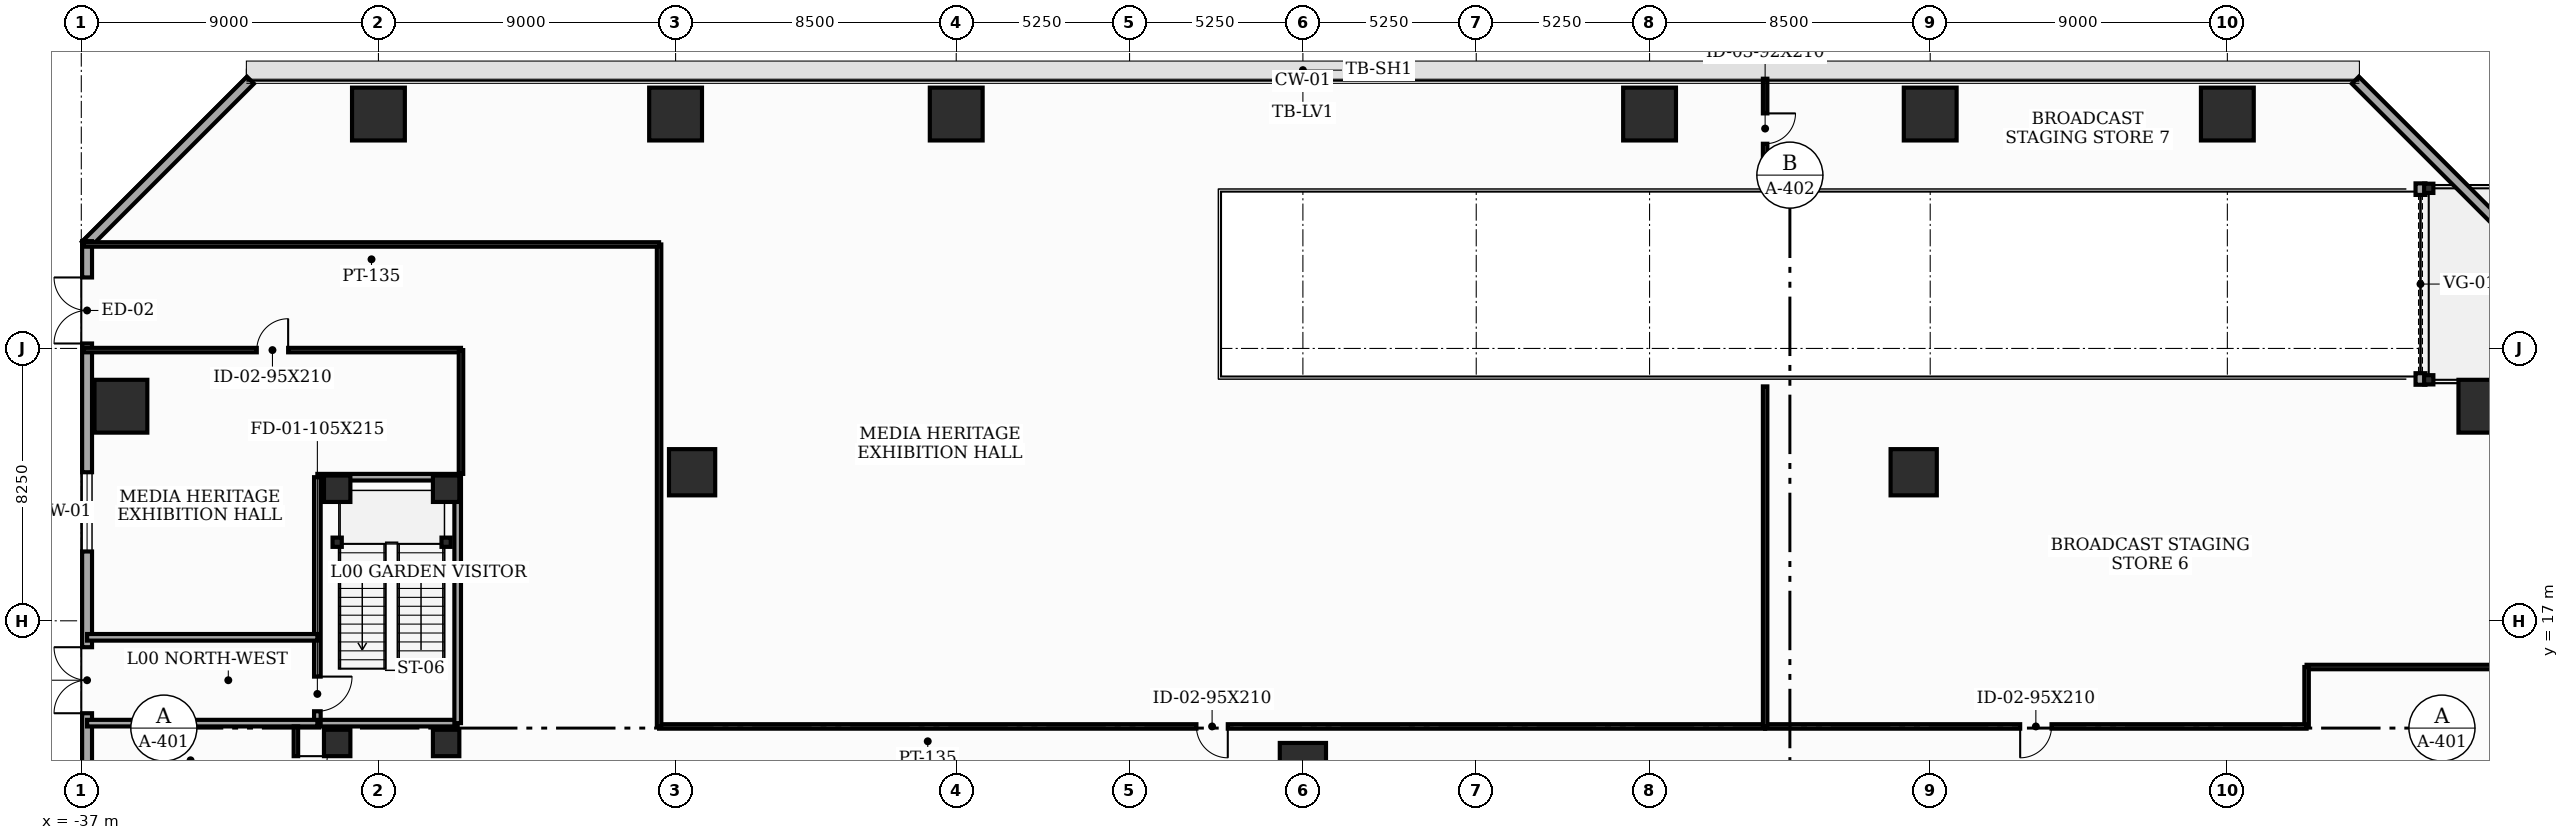
"""IFC4 building model, lengths in metres.
Left out: names, types, materials, properties, quantities, classifications, styles, units other than length and angle.
Written with IfcOpenShell. Run it as: python <this file> out.ifc"""

import sys

from ifc_helpers import new_model, si_unit, direction, frame, frame_2d, origin, origin_2d, place, context, subcontext, project, spatial, rectangle, i_section, extrude, element, fill, save


model = new_model("IFC4")
c1 = context("Model", 3, precision=1e-05, world=origin(), true_north=direction((0.0, 1.0)))
c2 = subcontext(c1, "Body", "Model", "MODEL_VIEW")
j1 = project(units=[si_unit("LENGTHUNIT", "METRE"), si_unit("PLANEANGLEUNIT", "RADIAN")], contexts=[c1])
p1 = place(None, origin())
s1 = spatial("IfcSite", under=j1, at=p1, CompositionType="ELEMENT")
p2 = place(p1, origin())
s2 = spatial("IfcBuilding", under=s1, at=p2, CompositionType="ELEMENT")
p3 = place(p2, origin())
s3 = spatial("IfcBuildingStorey", under=s2, at=p3, CompositionType="ELEMENT", Elevation=0.0)
p4 = place(p3, frame((0.0, 12.6, 0.0), z_axis=(0.0, 0.0, 1.0), x_axis=(1.0, 0.0, 0.0)))
e1 = element("IfcColumn", 1, at=p4, inside=s3, PredefinedType="COLUMN", context=c2, shape_type="SweptSolid", body=[
    extrude(rectangle(XDim=1.4, YDim=1.4, at=origin_2d()), origin(), (0.0, 0.0, 1.0), 5.2),
])
for number, where, z_axis, x_axis in (
    (2, (35.8, 23.5, 0.0), (0.0, 0.0, 1.0), (1.0, 0.0, 0.0)),
    (3, (28.0, 32.35, 0.0), (0.0, 0.0, 1.0), (1.0, 0.0, 0.0)),
    (4, (19.0, 32.35, 0.0), (0.0, 0.0, 1.0), (1.0, 0.0, 0.0)),
    (5, (10.5, 32.35, 0.0), (0.0, 0.0, 1.0), (1.0, 0.0, 0.0)),
    (6, (-10.5, 32.35, 0.0), (0.0, 0.0, 1.0), (1.0, 0.0, 0.0)),
    (7, (-19.0, 32.35, 0.0), (0.0, 0.0, 1.0), (1.0, 0.0, 0.0)),
    (8, (-28.0, 32.35, 0.0), (0.0, 0.0, 1.0), (1.0, 0.0, 0.0)),
    (9, (-35.8, 23.5, 0.0), (0.0, 0.0, 1.0), (1.0, 0.0, 0.0)),
):
    element("IfcColumn", number, at=place(p3, frame(where, z_axis=z_axis, x_axis=x_axis)), inside=s3, PredefinedType="COLUMN", context=c2, shape_type="SweptSolid", body=[
        extrude(rectangle(XDim=1.6, YDim=1.6, at=origin_2d()), origin(), (0.0, 0.0, 1.0), 5.2),
    ])
for number, where, z_axis, x_axis in (
    (10, (-18.5, 21.5, 0.0), (0.0, 0.0, 1.0), (1.0, 0.0, 0.0)),
    (11, (18.5, 21.5, 0.0), (0.0, 0.0, 1.0), (1.0, 0.0, 0.0)),
):
    element("IfcColumn", number, at=place(p3, frame(where, z_axis=z_axis, x_axis=x_axis)), inside=s3, PredefinedType="COLUMN", context=c2, shape_type="SweptSolid", body=[
        extrude(rectangle(XDim=1.4, YDim=1.4, at=origin_2d()), origin(), (0.0, 0.0, 1.0), 5.2),
    ])
for number, where, z_axis, x_axis in (
    (12, (-29.25, 13.3, 0.0), (0.0, 0.0, 1.0), (1.0, 0.0, 0.0)),
    (13, (-25.95, 13.3, 0.0), (0.0, 0.0, 1.0), (1.0, 0.0, 0.0)),
    (14, (-25.95, 21.0, 0.0), (0.0, 0.0, 1.0), (1.0, 0.0, 0.0)),
    (15, (-29.25, 21.0, 0.0), (0.0, 0.0, 1.0), (1.0, 0.0, 0.0)),
):
    element("IfcColumn", number, at=place(p3, frame(where, z_axis=z_axis, x_axis=x_axis)), inside=s3, PredefinedType="COLUMN", context=c2, shape_type="SweptSolid", body=[
        extrude(rectangle(XDim=0.8, YDim=0.8, at=origin_2d()), origin(), (0.0, 0.0, 1.0), 5.2),
    ])
for number, where, z_axis, x_axis in (
    (16, (-29.25, 19.38, 0.0), (0.0, 0.0, 1.0), (1.0, 0.0, 0.0)),
    (17, (-25.95, 19.38, 0.0), (0.0, 0.0, 1.0), (1.0, 0.0, 0.0)),
):
    element("IfcColumn", number, at=place(p3, frame(where, z_axis=z_axis, x_axis=x_axis)), inside=s3, PredefinedType="PILASTER", context=c2, shape_type="SweptSolid", body=[
        extrude(i_section(OverallWidth=0.28, OverallDepth=0.28, WebThickness=0.01, FlangeThickness=0.018, at=origin_2d()), origin(), (0.0, 0.0, 1.0), 5.2),
    ])
for number, where, z_axis, x_axis in (
    (18, (34.1, 24.3, 0.0), (0.0, 0.0, 1.0), (1.0, 0.0, 0.0)),
    (19, (34.1, 30.1, 0.0), (0.0, 0.0, 1.0), (1.0, 0.0, 0.0)),
):
    element("IfcColumn", number, at=place(p3, frame(where, z_axis=z_axis, x_axis=x_axis)), inside=s3, PredefinedType="PILASTER", context=c2, shape_type="SweptSolid", body=[
        extrude(i_section(OverallWidth=0.28, OverallDepth=0.28, WebThickness=0.01, FlangeThickness=0.018, at=origin_2d()), origin(), (0.0, 0.0, 1.0), 4.4),
    ])
p5 = place(p3, frame((33.85, 24.15, 0.0), z_axis=(0.0, 0.0, 1.0), x_axis=(0.0, 1.0, 0.0)))
e20 = element("IfcWall", 20, at=p5, inside=s3, PredefinedType="SOLIDWALL", context=c2, shape_type="SweptSolid", body=[
    extrude(rectangle(XDim=6.1, YDim=0.3, at=frame_2d((3.05, 0.0))), origin(), (0.0, 0.0, 1.0), 4.95),
])
p6 = place(p5, frame((0.35, 0.0, 0.0)))
e21 = element("IfcOpeningElement", 21, at=p6, cuts=e20, PredefinedType="OPENING", context=c2, shape_type="SweptSolid", body=[
    extrude(rectangle(XDim=5.4, YDim=2.8, at=frame_2d((2.7, 1.4))), frame((0.0, 0.16, 0.0), z_axis=(0.0, -1.0, 0.0), x_axis=(1.0, 0.0, 0.0)), (0.0, 0.0, 1.0), 0.32),
])
p7 = place(p3, frame((36.876, 28.376, 0.0), z_axis=(0.0, 0.0, 1.0), x_axis=(-0.707106781187, 0.707106781187, 0.0)))
e22 = element("IfcWall", 22, at=p7, inside=s3, PredefinedType="SOLIDWALL", context=c2, shape_type="SweptSolid", body=[
    extrude(rectangle(XDim=7.071, YDim=0.3, at=frame_2d((3.536, 0.0))), origin(), (0.0, 0.0, 1.0), 4.4),
])
p8 = place(p3, frame((-31.876, 33.376, 0.0), z_axis=(0.0, 0.0, 1.0), x_axis=(-0.707106781187, -0.707106781187, 0.0)))
e23 = element("IfcWall", 23, at=p8, inside=s3, PredefinedType="SOLIDWALL", context=c2, shape_type="SweptSolid", body=[
    extrude(rectangle(XDim=7.071, YDim=0.3, at=frame_2d((3.536, 0.0))), origin(), (0.0, 0.0, 1.0), 4.95),
])
p9 = place(p3, frame((-36.825, 28.5, 0.0), z_axis=(0.0, 0.0, 1.0), x_axis=(0.0, -1.0, 0.0)))
e24 = element("IfcWall", 24, at=p9, inside=s3, PredefinedType="SOLIDWALL", context=c2, shape_type="SweptSolid", body=[
    extrude(rectangle(XDim=48.0, YDim=0.3, at=frame_2d((24.0, 0.0))), origin(), (0.0, 0.0, 1.0), 4.95),
])
p10 = place(p9, frame((1.1, 0.0, 0.0)))
e25 = element("IfcOpeningElement", 25, at=p10, cuts=e24, PredefinedType="OPENING", context=c2, shape_type="SweptSolid", body=[
    extrude(rectangle(XDim=2.0, YDim=2.2, at=frame_2d((1.0, 1.1))), frame((0.0, 0.16, 0.0), z_axis=(0.0, -1.0, 0.0), x_axis=(1.0, 0.0, 0.0)), (0.0, 0.0, 1.0), 0.32),
])
p11 = place(p9, frame((12.3, 0.0, 0.0)))
e26 = element("IfcOpeningElement", 26, at=p11, cuts=e24, PredefinedType="OPENING", context=c2, shape_type="SweptSolid", body=[
    extrude(rectangle(XDim=2.0, YDim=2.2, at=frame_2d((1.0, 1.1))), frame((0.0, 0.16, 0.0), z_axis=(0.0, -1.0, 0.0), x_axis=(1.0, 0.0, 0.0)), (0.0, 0.0, 1.0), 0.32),
])
p12 = place(p9, frame((21.0, 0.0, 0.0)))
e27 = element("IfcOpeningElement", 27, at=p12, cuts=e24, PredefinedType="OPENING", context=c2, shape_type="SweptSolid", body=[
    extrude(rectangle(XDim=2.0, YDim=2.2, at=frame_2d((1.0, 1.1))), frame((0.0, 0.16, 0.0), z_axis=(0.0, -1.0, 0.0), x_axis=(1.0, 0.0, 0.0)), (0.0, 0.0, 1.0), 0.32),
])
p13 = place(p9, frame((7.0, 0.0, 0.9)))
e28 = element("IfcOpeningElement", 28, at=p13, cuts=e24, PredefinedType="OPENING", context=c2, shape_type="SweptSolid", body=[
    extrude(rectangle(XDim=2.4, YDim=1.35, at=frame_2d((1.2, 0.675))), frame((0.0, 0.16, 0.0), z_axis=(0.0, -1.0, 0.0), x_axis=(1.0, 0.0, 0.0)), (0.0, 0.0, 1.0), 0.32),
])
p14 = place(p9, frame((33.4, 0.0, 0.9)))
e29 = element("IfcOpeningElement", 29, at=p14, cuts=e24, PredefinedType="OPENING", context=c2, shape_type="SweptSolid", body=[
    extrude(rectangle(XDim=1.8, YDim=1.35, at=frame_2d((0.9, 0.675))), frame((0.0, 0.16, 0.0), z_axis=(0.0, -1.0, 0.0), x_axis=(1.0, 0.0, 0.0)), (0.0, 0.0, 1.0), 0.32),
])
p15 = place(p9, frame((38.0, 0.0, 0.9)))
e30 = element("IfcOpeningElement", 30, at=p15, cuts=e24, PredefinedType="OPENING", context=c2, shape_type="SweptSolid", body=[
    extrude(rectangle(XDim=2.4, YDim=1.35, at=frame_2d((1.2, 0.675))), frame((0.0, 0.16, 0.0), z_axis=(0.0, -1.0, 0.0), x_axis=(1.0, 0.0, 0.0)), (0.0, 0.0, 1.0), 0.32),
])
p16 = place(p3, frame((-29.85, 13.9, 0.0), z_axis=(0.0, 0.0, 1.0), x_axis=(1.0, 0.0, 0.0)))
e31 = element("IfcWall", 31, at=p16, inside=s3, PredefinedType="SOLIDWALL", context=c2, shape_type="SweptSolid", body=[
    extrude(rectangle(XDim=4.25, YDim=0.2, at=frame_2d((2.125, 0.0))), origin(), (0.0, 0.0, 1.0), 4.435),
])
p17 = place(p3, frame((-25.6, 13.9, 0.0), z_axis=(0.0, 0.0, 1.0), x_axis=(0.0, 1.0, 0.0)))
e32 = element("IfcWall", 32, at=p17, inside=s3, PredefinedType="SOLIDWALL", context=c2, shape_type="SweptSolid", body=[
    extrude(rectangle(XDim=7.45, YDim=0.2, at=frame_2d((3.725, 0.0))), origin(), (0.0, 0.0, 1.0), 4.435),
])
p18 = place(p3, frame((-25.6, 21.35, 0.0), z_axis=(0.0, 0.0, 1.0), x_axis=(-1.0, 0.0, 0.0)))
e33 = element("IfcWall", 33, at=p18, inside=s3, PredefinedType="SOLIDWALL", context=c2, shape_type="SweptSolid", body=[
    extrude(rectangle(XDim=4.25, YDim=0.2, at=frame_2d((2.125, 0.0))), origin(), (0.0, 0.0, 1.0), 4.95),
])
p19 = place(p3, frame((-29.85, 21.35, 0.0), z_axis=(0.0, 0.0, 1.0), x_axis=(0.0, -1.0, 0.0)))
e34 = element("IfcWall", 34, at=p19, inside=s3, PredefinedType="SOLIDWALL", context=c2, shape_type="SweptSolid", body=[
    extrude(rectangle(XDim=7.45, YDim=0.2, at=frame_2d((3.725, 0.0))), origin(), (0.0, 0.0, 1.0), 4.435),
])
p20 = place(p19, frame((6.04, 0.0, 0.0)))
e35 = element("IfcOpeningElement", 35, at=p20, cuts=e34, PredefinedType="OPENING", context=c2, shape_type="SweptSolid", body=[
    extrude(rectangle(XDim=1.05, YDim=2.15, at=frame_2d((0.525, 1.075))), frame((0.0, 0.11, 0.0), z_axis=(0.0, -1.0, 0.0), x_axis=(1.0, 0.0, 0.0)), (0.0, 0.0, 1.0), 0.22),
])
for number, where, z_axis, x_axis in (
    (36, (-36.825, 13.9, 0.0), (0.0, 0.0, 1.0), (1.0, 0.0, 0.0)),
    (37, (-29.85, 16.5, 0.0), (0.0, 0.0, 1.0), (-1.0, 0.0, 0.0)),
):
    element("IfcWall", number, at=place(p3, frame(where, z_axis=z_axis, x_axis=x_axis)), inside=s3, PredefinedType="SOLIDWALL", context=c2, shape_type="SweptSolid", body=[
        extrude(rectangle(XDim=6.975, YDim=0.2, at=frame_2d((3.487, 0.0))), origin(), (0.0, 0.0, 1.0), 4.235),
    ])
p21 = place(p3, frame((36.92, 15.6, 0.0), z_axis=(0.0, 0.0, 1.0), x_axis=(-1.0, 0.0, 0.0)))
e38 = element("IfcWall", 38, at=p21, inside=s3, PredefinedType="PARTITIONING", context=c2, shape_type="SweptSolid", body=[
    extrude(rectangle(XDim=6.52, YDim=0.135, at=frame_2d((3.26, 0.0))), origin(), (0.0, 0.0, 1.0), 4.235),
])
p22 = place(p3, frame((30.4, 15.6, 0.0), z_axis=(0.0, 0.0, 1.0), x_axis=(0.0, -1.0, 0.0)))
e39 = element("IfcWall", 39, at=p22, inside=s3, PredefinedType="PARTITIONING", context=c2, shape_type="SweptSolid", body=[
    extrude(rectangle(XDim=1.8, YDim=0.135, at=frame_2d((0.9, 0.0))), origin(), (0.0, 0.0, 1.0), 4.95),
])
p23 = place(p3, frame((30.4, 13.8, 0.0), z_axis=(0.0, 0.0, 1.0), x_axis=(-1.0, 0.0, 0.0)))
e40 = element("IfcWall", 40, at=p23, inside=s3, PredefinedType="PARTITIONING", context=c2, shape_type="SweptSolid", body=[
    extrude(rectangle(XDim=16.4, YDim=0.135, at=frame_2d((8.2, 0.0))), origin(), (0.0, 0.0, 1.0), 4.235),
])
p24 = place(p23, frame((7.725, 0.0, 0.0)))
e41 = element("IfcOpeningElement", 41, at=p24, cuts=e40, PredefinedType="OPENING", context=c2, shape_type="SweptSolid", body=[
    extrude(rectangle(XDim=0.95, YDim=2.1, at=frame_2d((0.475, 1.05))), frame((0.0, 0.077, 0.0), z_axis=(0.0, -1.0, 0.0), x_axis=(1.0, 0.0, 0.0)), (0.0, 0.0, 1.0), 0.155),
])
p25 = place(p3, frame((14.0, 13.8, 0.0), z_axis=(0.0, 0.0, 1.0), x_axis=(-1.0, 0.0, 0.0)))
e42 = element("IfcWall", 42, at=p25, inside=s3, PredefinedType="PARTITIONING", context=c2, shape_type="SweptSolid", body=[
    extrude(rectangle(XDim=33.5, YDim=0.135, at=frame_2d((16.75, 0.0))), origin(), (0.0, 0.0, 1.0), 3.435),
])
p26 = place(p25, frame((16.275, 0.0, 0.0)))
e43 = element("IfcOpeningElement", 43, at=p26, cuts=e42, PredefinedType="OPENING", context=c2, shape_type="SweptSolid", body=[
    extrude(rectangle(XDim=0.95, YDim=2.1, at=frame_2d((0.475, 1.05))), frame((0.0, 0.077, 0.0), z_axis=(0.0, -1.0, 0.0), x_axis=(1.0, 0.0, 0.0)), (0.0, 0.0, 1.0), 0.155),
])
p27 = place(p3, frame((-19.5, 13.8, 0.0), z_axis=(0.0, 0.0, 1.0), x_axis=(0.0, 1.0, 0.0)))
e44 = element("IfcWall", 44, at=p27, inside=s3, PredefinedType="PARTITIONING", context=c2, shape_type="SweptSolid", body=[
    extrude(rectangle(XDim=14.6, YDim=0.135, at=frame_2d((7.3, 0.0))), origin(), (0.0, 0.0, 1.0), 3.435),
])
p28 = place(p3, frame((-19.5, 28.4, 0.0), z_axis=(0.0, 0.0, 1.0), x_axis=(-1.0, 0.0, 0.0)))
e45 = element("IfcWall", 45, at=p28, inside=s3, PredefinedType="PARTITIONING", context=c2, shape_type="SweptSolid", body=[
    extrude(rectangle(XDim=17.42, YDim=0.135, at=frame_2d((8.71, 0.0))), origin(), (0.0, 0.0, 1.0), 3.435),
])
p29 = place(p3, frame((-36.92, 25.2, 0.0), z_axis=(0.0, 0.0, 1.0), x_axis=(1.0, 0.0, 0.0)))
e46 = element("IfcWall", 46, at=p29, inside=s3, PredefinedType="PARTITIONING", context=c2, shape_type="SweptSolid", body=[
    extrude(rectangle(XDim=11.42, YDim=0.135, at=frame_2d((5.71, 0.0))), origin(), (0.0, 0.0, 1.0), 4.235),
])
p30 = place(p29, frame((5.235, 0.0, 0.0)))
e47 = element("IfcOpeningElement", 47, at=p30, cuts=e46, PredefinedType="OPENING", context=c2, shape_type="SweptSolid", body=[
    extrude(rectangle(XDim=0.95, YDim=2.1, at=frame_2d((0.475, 1.05))), frame((0.0, 0.077, 0.0), z_axis=(0.0, -1.0, 0.0), x_axis=(1.0, 0.0, 0.0)), (0.0, 0.0, 1.0), 0.155),
])
p31 = place(p3, frame((-25.5, 25.2, 0.0), z_axis=(0.0, 0.0, 1.0), x_axis=(0.0, -1.0, 0.0)))
e48 = element("IfcWall", 48, at=p31, inside=s3, PredefinedType="PARTITIONING", context=c2, shape_type="SweptSolid", body=[
    extrude(rectangle(XDim=3.75, YDim=0.135, at=frame_2d((1.875, 0.0))), origin(), (0.0, 0.0, 1.0), 3.435),
])
p32 = place(p3, frame((-30.5, 13.8, 0.0), z_axis=(0.0, 0.0, 1.0), x_axis=(0.0, -1.0, 0.0)))
e49 = element("IfcWall", 49, at=p32, inside=s3, PredefinedType="PARTITIONING", context=c2, shape_type="SweptSolid", body=[
    extrude(rectangle(XDim=2.05, YDim=0.135, at=frame_2d((1.025, 0.0))), origin(), (0.0, 0.0, 1.0), 4.95),
])
p33 = place(p32, frame((0.9, 0.0, 0.0)))
e50 = element("IfcOpeningElement", 50, at=p33, cuts=e49, PredefinedType="OPENING", context=c2, shape_type="SweptSolid", body=[
    extrude(rectangle(XDim=0.95, YDim=2.1, at=frame_2d((0.475, 1.05))), frame((0.0, 0.077, 0.0), z_axis=(0.0, -1.0, 0.0), x_axis=(1.0, 0.0, 0.0)), (0.0, 0.0, 1.0), 0.155),
])
p34 = place(p3, frame((14.0, 24.1, 0.0), z_axis=(0.0, 0.0, 1.0), x_axis=(0.0, -1.0, 0.0)))
e51 = element("IfcWall", 51, at=p34, inside=s3, PredefinedType="PARTITIONING", context=c2, shape_type="SweptSolid", body=[
    extrude(rectangle(XDim=10.3, YDim=0.135, at=frame_2d((5.15, 0.0))), origin(), (0.0, 0.0, 1.0), 3.435),
])
p35 = place(p3, frame((14.0, 33.42, 0.0), z_axis=(0.0, 0.0, 1.0), x_axis=(0.0, -1.0, 0.0)))
e52 = element("IfcWall", 52, at=p35, inside=s3, PredefinedType="PARTITIONING", context=c2, shape_type="SweptSolid", body=[
    extrude(rectangle(XDim=3.02, YDim=0.135, at=frame_2d((1.51, 0.0))), origin(), (0.0, 0.0, 1.0), 4.235),
])
p36 = place(p35, frame((1.05, 0.0, 0.0)))
e53 = element("IfcOpeningElement", 53, at=p36, cuts=e52, PredefinedType="OPENING", context=c2, shape_type="SweptSolid", body=[
    extrude(rectangle(XDim=0.92, YDim=2.1, at=frame_2d((0.46, 1.05))), frame((0.0, 0.077, 0.0), z_axis=(0.0, -1.0, 0.0), x_axis=(1.0, 0.0, 0.0)), (0.0, 0.0, 1.0), 0.155),
])
p37 = place(p6, origin())
e54 = element("IfcDoor", 54, at=p37, inside=s3, OperationType="ROLLINGUP", PredefinedType="GATE", context=c2, shape_type="SweptSolid", body=[
    extrude(rectangle(XDim=5.4, YDim=2.8, at=frame_2d((2.7, 1.4))), frame((0.0, 0.025, 0.0), z_axis=(0.0, -1.0, 0.0), x_axis=(1.0, 0.0, 0.0)), (0.0, 0.0, 1.0), 0.05),
])
fill(e21, e54)
p38 = place(p10, frame((2.0, 0.0, 0.0), z_axis=(0.0, 0.0, 1.0), x_axis=(-1.0, 0.0, 0.0)))
e55 = element("IfcDoor", 55, at=p38, inside=s3, OperationType="DOUBLE_DOOR_SINGLE_SWING", PredefinedType="DOOR", context=c2, shape_type="SweptSolid", body=[
    extrude(rectangle(XDim=2.0, YDim=2.2, at=frame_2d((1.0, 1.1))), frame((0.0, 0.025, 0.0), z_axis=(0.0, -1.0, 0.0), x_axis=(1.0, 0.0, 0.0)), (0.0, 0.0, 1.0), 0.05),
])
fill(e25, e55)
p39 = place(p11, frame((2.0, 0.0, 0.0), z_axis=(0.0, 0.0, 1.0), x_axis=(-1.0, 0.0, 0.0)))
e56 = element("IfcDoor", 56, at=p39, inside=s3, OperationType="DOUBLE_DOOR_SINGLE_SWING", PredefinedType="DOOR", context=c2, shape_type="SweptSolid", body=[
    extrude(rectangle(XDim=2.0, YDim=2.2, at=frame_2d((1.0, 1.1))), frame((0.0, 0.025, 0.0), z_axis=(0.0, -1.0, 0.0), x_axis=(1.0, 0.0, 0.0)), (0.0, 0.0, 1.0), 0.05),
])
fill(e26, e56)
p40 = place(p13, origin())
e57 = element("IfcWindow", 57, at=p40, inside=s3, PartitioningType="SINGLE_PANEL", PredefinedType="WINDOW", context=c2, shape_type="SweptSolid", body=[
    extrude(rectangle(XDim=2.4, YDim=1.35, at=frame_2d((1.2, 0.675))), frame((0.0, 0.03, 0.0), z_axis=(0.0, -1.0, 0.0), x_axis=(1.0, 0.0, 0.0)), (0.0, 0.0, 1.0), 0.06),
])
fill(e28, e57)
p41 = place(p20, origin())
e58 = element("IfcDoor", 58, at=p41, inside=s3, OperationType="SINGLE_SWING_LEFT", PredefinedType="DOOR", context=c2, shape_type="SweptSolid", body=[
    extrude(rectangle(XDim=1.05, YDim=2.15, at=frame_2d((0.525, 1.075))), frame((0.0, 0.025, 0.0), z_axis=(0.0, -1.0, 0.0), x_axis=(1.0, 0.0, 0.0)), (0.0, 0.0, 1.0), 0.05),
])
fill(e35, e58)
p42 = place(p24, origin())
e59 = element("IfcDoor", 59, at=p42, inside=s3, OperationType="SINGLE_SWING_RIGHT", PredefinedType="DOOR", context=c2, shape_type="SweptSolid", body=[
    extrude(rectangle(XDim=0.95, YDim=2.1, at=frame_2d((0.475, 1.05))), frame((0.0, 0.025, 0.0), z_axis=(0.0, -1.0, 0.0), x_axis=(1.0, 0.0, 0.0)), (0.0, 0.0, 1.0), 0.05),
])
fill(e41, e59)
p43 = place(p26, origin())
e60 = element("IfcDoor", 60, at=p43, inside=s3, OperationType="SINGLE_SWING_LEFT", PredefinedType="DOOR", context=c2, shape_type="SweptSolid", body=[
    extrude(rectangle(XDim=0.95, YDim=2.1, at=frame_2d((0.475, 1.05))), frame((0.0, 0.025, 0.0), z_axis=(0.0, -1.0, 0.0), x_axis=(1.0, 0.0, 0.0)), (0.0, 0.0, 1.0), 0.05),
])
fill(e43, e60)
p44 = place(p30, origin())
e61 = element("IfcDoor", 61, at=p44, inside=s3, OperationType="SINGLE_SWING_RIGHT", PredefinedType="DOOR", context=c2, shape_type="SweptSolid", body=[
    extrude(rectangle(XDim=0.95, YDim=2.1, at=frame_2d((0.475, 1.05))), frame((0.0, 0.025, 0.0), z_axis=(0.0, -1.0, 0.0), x_axis=(1.0, 0.0, 0.0)), (0.0, 0.0, 1.0), 0.05),
])
fill(e47, e61)
p45 = place(p33, origin())
e62 = element("IfcDoor", 62, at=p45, inside=s3, OperationType="SINGLE_SWING_LEFT", PredefinedType="DOOR", context=c2, shape_type="SweptSolid", body=[
    extrude(rectangle(XDim=0.95, YDim=2.1, at=frame_2d((0.475, 1.05))), frame((0.0, 0.025, 0.0), z_axis=(0.0, -1.0, 0.0), x_axis=(1.0, 0.0, 0.0)), (0.0, 0.0, 1.0), 0.05),
])
fill(e50, e62)
p46 = place(p36, origin())
e63 = element("IfcDoor", 63, at=p46, inside=s3, OperationType="SINGLE_SWING_LEFT", PredefinedType="DOOR", context=c2, shape_type="SweptSolid", body=[
    extrude(rectangle(XDim=0.92, YDim=2.1, at=frame_2d((0.46, 1.05))), frame((0.0, 0.025, 0.0), z_axis=(0.0, -1.0, 0.0), x_axis=(1.0, 0.0, 0.0)), (0.0, 0.0, 1.0), 0.05),
])
fill(e53, e63)
save(model, sys.argv[1])
